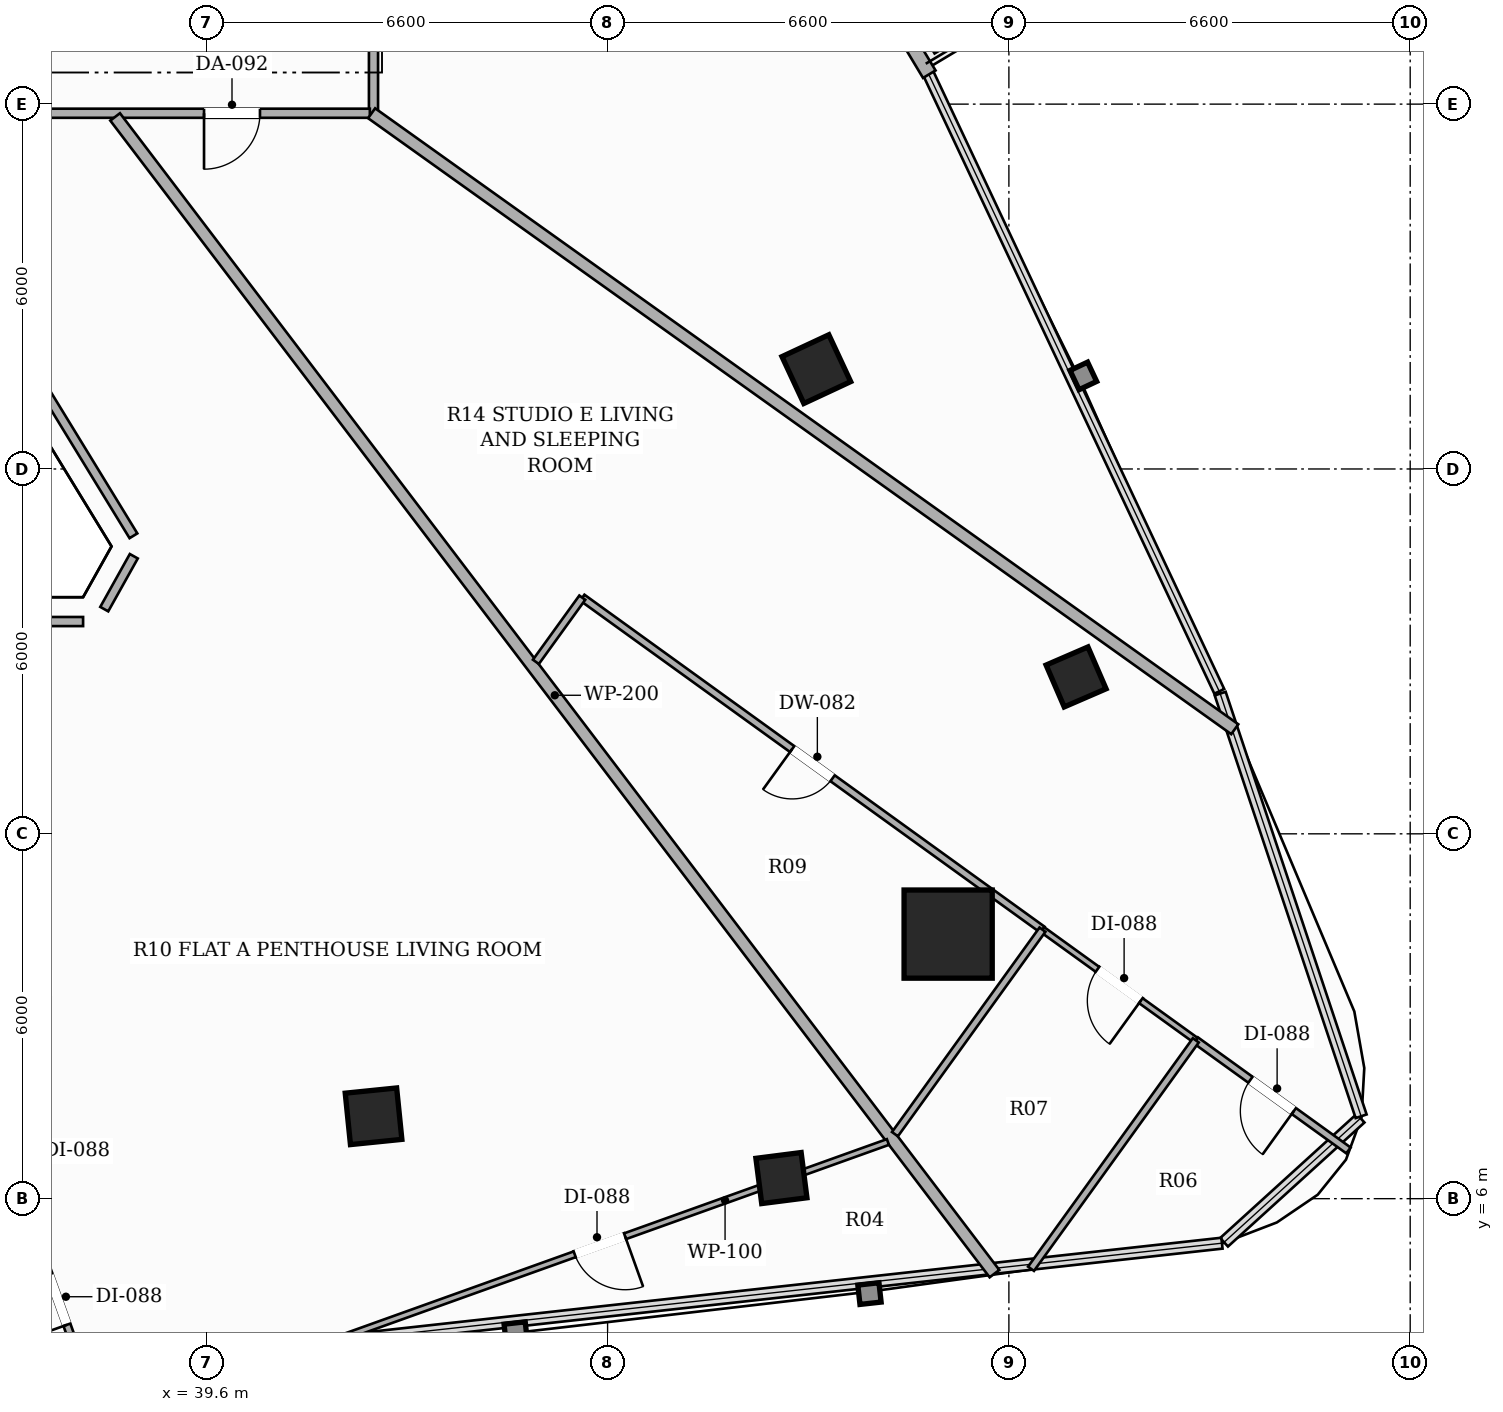
"""IFC4 building model, lengths in metres.
Left out: names, types, materials, properties, quantities, classifications, styles, units other than length and angle.
Written with IfcOpenShell. Run it as: python <this file> out.ifc"""

import sys

from ifc_helpers import new_model, si_unit, direction, frame, frame_2d, origin, origin_2d, place, context, subcontext, project, spatial, rectangle, hollow_rectangle, extrude, element, fill, save


model = new_model("IFC4")
c1 = context("Model", 3, precision=1e-05, world=origin(), true_north=direction((0.0, 1.0)))
c2 = subcontext(c1, "Body", "Model", "MODEL_VIEW")
j1 = project(units=[si_unit("LENGTHUNIT", "METRE"), si_unit("PLANEANGLEUNIT", "RADIAN")], contexts=[c1])
p1 = place(None, origin())
s1 = spatial("IfcSite", under=j1, at=p1, CompositionType="ELEMENT")
p2 = place(p1, origin())
s2 = spatial("IfcBuilding", under=s1, at=p2, CompositionType="ELEMENT")
p3 = place(p2, frame((0.0, 0.0, 136.4)))
s3 = spatial("IfcBuildingStorey", under=s2, at=p3, CompositionType="ELEMENT", Elevation=136.4)
p4 = place(p3, frame((51.801, 10.351, 0.0), z_axis=(0.0, 0.0, 1.0), x_axis=(1.0, 0.0, 0.0)))
e1 = element("IfcColumn", 1, at=p4, inside=s3, PredefinedType="COLUMN", context=c2, shape_type="SweptSolid", body=[
    extrude(hollow_rectangle(XDim=1.45, YDim=1.45, WallThickness=0.045, at=origin_2d()), origin(), (0.0, 0.0, 1.0), 3.3),
])
for number, where, z_axis, x_axis in (
    (2, (42.351, 7.355, 0.0), (0.0, 0.0, 1.0), (0.995, 0.101, 0.0)),
    (3, (49.633, 19.642, 0.0), (0.0, 0.0, 1.0), (-0.423, 0.906, 0.0)),
):
    element("IfcColumn", number, at=place(p3, frame(where, z_axis=z_axis, x_axis=x_axis)), inside=s3, PredefinedType="COLUMN", context=c2, shape_type="SweptSolid", body=[
        extrude(hollow_rectangle(XDim=0.85, YDim=0.85, WallThickness=0.028, at=origin_2d()), origin(), (0.0, 0.0, 1.0), 3.3),
    ])
for number, where, z_axis, x_axis in (
    (4, (49.059, 6.339, 0.0), (0.0, 0.0, 1.0), (0.992, 0.127, 0.0)),
    (5, (53.905, 14.58, 0.0), (0.0, 0.0, 1.0), (-0.397, 0.918, 0.0)),
):
    element("IfcColumn", number, at=place(p3, frame(where, z_axis=z_axis, x_axis=x_axis)), inside=s3, PredefinedType="COLUMN", context=c2, shape_type="SweptSolid", body=[
        extrude(hollow_rectangle(XDim=0.75, YDim=0.75, WallThickness=0.025, at=origin_2d()), origin(), (0.0, 0.0, 1.0), 3.3),
    ])
p5 = place(p3, frame((51.491, 24.492, 0.0), z_axis=(0.0, 0.0, 1.0), x_axis=(-0.514364263751, 0.857571807009, 0.0)))
e6 = element("IfcWall", 6, at=p5, inside=s3, PredefinedType="SOLIDWALL", context=c2, shape_type="SweptSolid", body=[
    extrude(rectangle(XDim=11.468, YDim=0.24, at=frame_2d((5.734, 0.0))), origin(), (0.0, 0.0, 1.0), 2.624),
])
p6 = place(p5, frame((8.972, 0.0, 0.0)))
e7 = element("IfcOpeningElement", 7, at=p6, cuts=e6, PredefinedType="OPENING", context=c2, shape_type="SweptSolid", body=[
    extrude(rectangle(XDim=1.8, YDim=2.2, at=frame_2d((0.9, 1.1))), frame((0.0, 0.13, 0.0), z_axis=(0.0, -1.0, 0.0), x_axis=(1.0, 0.0, 0.0)), (0.0, 0.0, 1.0), 0.26),
])
p7 = place(p3, frame((42.35, 28.34, 0.0), z_axis=(0.0, 0.0, 1.0), x_axis=(0.0, -1.0, 0.0)))
e8 = element("IfcWall", 8, at=p7, inside=s3, PredefinedType="PARTITIONING", context=c2, shape_type="SweptSolid", body=[
    extrude(rectangle(XDim=4.49, YDim=0.15, at=frame_2d((2.245, 0.0))), origin(), (0.0, 0.0, 1.0), 2.721),
])
p8 = place(p7, frame((1.805, 0.0, 0.0)))
e9 = element("IfcOpeningElement", 9, at=p8, cuts=e8, PredefinedType="OPENING", context=c2, shape_type="SweptSolid", body=[
    extrude(rectangle(XDim=0.88, YDim=2.1, at=frame_2d((0.44, 1.05))), frame((0.0, 0.085, 0.0), z_axis=(0.0, -1.0, 0.0), x_axis=(1.0, 0.0, 0.0)), (0.0, 0.0, 1.0), 0.17),
])
p9 = place(p3, frame((42.29, 23.85, 0.0), z_axis=(0.0, 0.0, 1.0), x_axis=(-1.0, 0.0, 0.0)))
e10 = element("IfcWall", 10, at=p9, inside=s3, PredefinedType="PARTITIONING", context=c2, shape_type="SweptSolid", body=[
    extrude(rectangle(XDim=8.134, YDim=0.15, at=frame_2d((4.067, 0.0))), origin(), (0.0, 0.0, 1.0), 2.492),
])
p10 = place(p9, frame((5.546, 0.0, 0.0)))
e11 = element("IfcOpeningElement", 11, at=p10, cuts=e10, PredefinedType="OPENING", context=c2, shape_type="SweptSolid", body=[
    extrude(rectangle(XDim=0.92, YDim=2.15, at=frame_2d((0.46, 1.075))), frame((0.0, 0.085, 0.0), z_axis=(0.0, -1.0, 0.0), x_axis=(1.0, 0.0, 0.0)), (0.0, 0.0, 1.0), 0.17),
])
p11 = place(p9, frame((1.807, 0.0, 0.0)))
e12 = element("IfcOpeningElement", 12, at=p11, cuts=e10, PredefinedType="OPENING", context=c2, shape_type="SweptSolid", body=[
    extrude(rectangle(XDim=0.92, YDim=2.15, at=frame_2d((0.46, 1.075))), frame((0.0, 0.085, 0.0), z_axis=(0.0, -1.0, 0.0), x_axis=(1.0, 0.0, 0.0)), (0.0, 0.0, 1.0), 0.17),
])
p12 = place(p3, frame((34.188, 23.79, 0.0), z_axis=(0.0, 0.0, 1.0), x_axis=(0.521816809014, -0.853057570057, 0.0)))
e13 = element("IfcWall", 13, at=p12, inside=s3, PredefinedType="PARTITIONING", context=c2, shape_type="SweptSolid", body=[
    extrude(rectangle(XDim=8.076, YDim=0.15, at=frame_2d((4.038, 0.0))), origin(), (0.0, 0.0, 1.0), 2.721),
])
p13 = place(p3, frame((38.408, 16.565, 0.0), z_axis=(0.0, 0.0, 1.0), x_axis=(-0.48761814532, -0.873057010942, 0.0)))
e14 = element("IfcWall", 14, at=p13, inside=s3, PredefinedType="PARTITIONING", context=c2, shape_type="SweptSolid", body=[
    extrude(rectangle(XDim=0.996, YDim=0.15, at=frame_2d((0.498, 0.0))), origin(), (0.0, 0.0, 1.0), 3.06),
])
p14 = place(p3, frame((37.574, 15.491, 0.0), z_axis=(0.0, 0.0, 1.0), x_axis=(-1.0, 0.0, 0.0)))
e15 = element("IfcWall", 15, at=p14, inside=s3, PredefinedType="PARTITIONING", context=c2, shape_type="SweptSolid", body=[
    extrude(rectangle(XDim=9.148, YDim=0.15, at=frame_2d((4.574, 0.0))), origin(), (0.0, 0.0, 1.0), 2.721),
])
p15 = place(p3, frame((38.101, 23.79, 0.0), z_axis=(0.0, 0.0, 1.0), x_axis=(0.605201904092, -0.796072016393, 0.0)))
e16 = element("IfcWall", 16, at=p15, inside=s3, PredefinedType="PARTITIONING", context=c2, shape_type="SweptSolid", body=[
    extrude(rectangle(XDim=23.896, YDim=0.2, at=frame_2d((11.948, 0.0))), origin(), (0.0, 0.0, 1.0), 2.413),
])
p16 = place(p3, frame((56.515, 13.72, 0.0), z_axis=(0.0, 0.0, 1.0), x_axis=(-0.813997291107, 0.580868668522, 0.0)))
e17 = element("IfcWall", 17, at=p16, inside=s3, PredefinedType="PARTITIONING", context=c2, shape_type="SweptSolid", body=[
    extrude(rectangle(XDim=17.44, YDim=0.2, at=frame_2d((8.72, 0.0))), origin(), (0.0, 0.0, 1.0), 2.413),
])
p17 = place(p3, frame((37.527, 3.315, 0.0), z_axis=(0.0, 0.0, 1.0), x_axis=(-0.337393850622, 0.9413635799, 0.0)))
e18 = element("IfcWall", 18, at=p17, inside=s3, PredefinedType="PARTITIONING", context=c2, shape_type="SweptSolid", body=[
    extrude(rectangle(XDim=2.179, YDim=0.12, at=frame_2d((1.089, 0.0))), origin(), (0.0, 0.0, 1.0), 3.06),
])
p18 = place(p17, frame((0.649, 0.0, 0.0)))
e19 = element("IfcOpeningElement", 19, at=p18, cuts=e18, PredefinedType="OPENING", context=c2, shape_type="SweptSolid", body=[
    extrude(rectangle(XDim=0.88, YDim=2.1, at=frame_2d((0.44, 1.05))), frame((0.0, 0.07, 0.0), z_axis=(0.0, -1.0, 0.0), x_axis=(1.0, 0.0, 0.0)), (0.0, 0.0, 1.0), 0.14),
])
p19 = place(p3, frame((50.81, 6.932, 0.0), z_axis=(0.0, 0.0, 1.0), x_axis=(-0.941340567411, -0.337458050943, 0.0)))
e20 = element("IfcWall", 20, at=p19, inside=s3, PredefinedType="PARTITIONING", context=c2, shape_type="SweptSolid", body=[
    extrude(rectangle(XDim=10.063, YDim=0.1, at=frame_2d((5.032, 0.0))), origin(), (0.0, 0.0, 1.0), 2.413),
])
p20 = place(p19, frame((4.592, 0.0, 0.0)))
e21 = element("IfcOpeningElement", 21, at=p20, cuts=e20, PredefinedType="OPENING", context=c2, shape_type="SweptSolid", body=[
    extrude(rectangle(XDim=0.88, YDim=2.1, at=frame_2d((0.44, 1.05))), frame((0.0, 0.06, 0.0), z_axis=(0.0, -1.0, 0.0), x_axis=(1.0, 0.0, 0.0)), (0.0, 0.0, 1.0), 0.12),
])
p21 = place(p3, frame((53.352, 10.424, 0.0), z_axis=(0.0, 0.0, 1.0), x_axis=(-0.810979209295, 0.585074971343, 0.0)))
e22 = element("IfcWall", 22, at=p21, inside=s3, PredefinedType="PARTITIONING", context=c2, shape_type="SweptSolid", body=[
    extrude(rectangle(XDim=9.332, YDim=0.12, at=frame_2d((4.666, 0.0))), origin(), (0.0, 0.0, 1.0), 2.413),
])
p22 = place(p21, frame((4.256, 0.0, 0.0)))
e23 = element("IfcOpeningElement", 23, at=p22, cuts=e22, PredefinedType="OPENING", context=c2, shape_type="SweptSolid", body=[
    extrude(rectangle(XDim=0.82, YDim=2.1, at=frame_2d((0.41, 1.05))), frame((0.0, 0.07, 0.0), z_axis=(0.0, -1.0, 0.0), x_axis=(1.0, 0.0, 0.0)), (0.0, 0.0, 1.0), 0.14),
])
p23 = place(p3, frame((45.784, 15.884, 0.0), z_axis=(0.0, 0.0, 1.0), x_axis=(-0.58557264979, -0.810619930558, 0.0)))
e24 = element("IfcWall", 24, at=p23, inside=s3, PredefinedType="PARTITIONING", context=c2, shape_type="SweptSolid", body=[
    extrude(rectangle(XDim=1.303, YDim=0.12, at=frame_2d((0.651, 0.0))), origin(), (0.0, 0.0, 1.0), 2.721),
])
p24 = place(p3, frame((58.385, 6.793, 0.0), z_axis=(0.0, 0.0, 1.0), x_axis=(-0.811055436316, 0.584969297675, 0.0)))
e25 = element("IfcWall", 25, at=p24, inside=s3, PredefinedType="PARTITIONING", context=c2, shape_type="SweptSolid", body=[
    extrude(rectangle(XDim=3.096, YDim=0.12, at=frame_2d((1.548, 0.0))), origin(), (0.0, 0.0, 1.0), 3.06),
])
p25 = place(p24, frame((1.108, 0.0, 0.0)))
e26 = element("IfcOpeningElement", 26, at=p25, cuts=e25, PredefinedType="OPENING", context=c2, shape_type="SweptSolid", body=[
    extrude(rectangle(XDim=0.88, YDim=2.1, at=frame_2d((0.44, 1.05))), frame((0.0, 0.07, 0.0), z_axis=(0.0, -1.0, 0.0), x_axis=(1.0, 0.0, 0.0)), (0.0, 0.0, 1.0), 0.14),
])
p26 = place(p3, frame((55.874, 8.604, 0.0), z_axis=(0.0, 0.0, 1.0), x_axis=(-0.810886170902, 0.585203911333, 0.0)))
e27 = element("IfcWall", 27, at=p26, inside=s3, PredefinedType="PARTITIONING", context=c2, shape_type="SweptSolid", body=[
    extrude(rectangle(XDim=3.11, YDim=0.1, at=frame_2d((1.555, 0.0))), origin(), (0.0, 0.0, 1.0), 2.619),
])
p27 = place(p26, frame((1.115, 0.0, 0.0)))
e28 = element("IfcOpeningElement", 28, at=p27, cuts=e27, PredefinedType="OPENING", context=c2, shape_type="SweptSolid", body=[
    extrude(rectangle(XDim=0.88, YDim=2.1, at=frame_2d((0.44, 1.05))), frame((0.0, 0.06, 0.0), z_axis=(0.0, -1.0, 0.0), x_axis=(1.0, 0.0, 0.0)), (0.0, 0.0, 1.0), 0.12),
])
p28 = place(p3, frame((53.352, 10.424, 0.0), z_axis=(0.0, 0.0, 1.0), x_axis=(-0.585041198475, -0.811003573412, 0.0)))
e29 = element("IfcWall", 29, at=p28, inside=s3, PredefinedType="PARTITIONING", context=c2, shape_type="SweptSolid", body=[
    extrude(rectangle(XDim=4.147, YDim=0.12, at=frame_2d((2.073, 0.0))), origin(), (0.0, 0.0, 1.0), 2.619),
])
p29 = place(p3, frame((53.164, 4.847, 0.0), z_axis=(0.0, 0.0, 1.0), x_axis=(0.58499591955, 0.81103623477, 0.0)))
e30 = element("IfcWall", 30, at=p29, inside=s3, PredefinedType="PARTITIONING", context=c2, shape_type="SweptSolid", body=[
    extrude(rectangle(XDim=4.632, YDim=0.12, at=frame_2d((2.316, 0.0))), origin(), (0.0, 0.0, 1.0), 3.06),
])
p30 = place(p18, origin())
e31 = element("IfcDoor", 31, at=p30, inside=s3, OperationType="SINGLE_SWING_LEFT", PredefinedType="DOOR", context=c2, shape_type="SweptSolid", body=[
    extrude(rectangle(XDim=0.88, YDim=2.1, at=frame_2d((0.44, 1.05))), frame((0.0, 0.025, 0.0), z_axis=(0.0, -1.0, 0.0), x_axis=(1.0, 0.0, 0.0)), (0.0, 0.0, 1.0), 0.05),
])
fill(e19, e31)
p31 = place(p20, origin())
e32 = element("IfcDoor", 32, at=p31, inside=s3, OperationType="SINGLE_SWING_LEFT", PredefinedType="DOOR", context=c2, shape_type="SweptSolid", body=[
    extrude(rectangle(XDim=0.88, YDim=2.1, at=frame_2d((0.44, 1.05))), frame((0.0, 0.025, 0.0), z_axis=(0.0, -1.0, 0.0), x_axis=(1.0, 0.0, 0.0)), (0.0, 0.0, 1.0), 0.05),
])
fill(e21, e32)
p32 = place(p11, origin())
e33 = element("IfcDoor", 33, at=p32, inside=s3, OperationType="SINGLE_SWING_RIGHT", PredefinedType="DOOR", context=c2, shape_type="SweptSolid", body=[
    extrude(rectangle(XDim=0.92, YDim=2.15, at=frame_2d((0.46, 1.075))), frame((0.0, 0.025, 0.0), z_axis=(0.0, -1.0, 0.0), x_axis=(1.0, 0.0, 0.0)), (0.0, 0.0, 1.0), 0.05),
])
fill(e12, e33)
p33 = place(p22, origin())
e34 = element("IfcDoor", 34, at=p33, inside=s3, OperationType="SINGLE_SWING_RIGHT", PredefinedType="DOOR", context=c2, shape_type="SweptSolid", body=[
    extrude(rectangle(XDim=0.82, YDim=2.1, at=frame_2d((0.41, 1.05))), frame((0.0, 0.025, 0.0), z_axis=(0.0, -1.0, 0.0), x_axis=(1.0, 0.0, 0.0)), (0.0, 0.0, 1.0), 0.05),
])
fill(e23, e34)
p34 = place(p25, origin())
e35 = element("IfcDoor", 35, at=p34, inside=s3, OperationType="SINGLE_SWING_LEFT", PredefinedType="DOOR", context=c2, shape_type="SweptSolid", body=[
    extrude(rectangle(XDim=0.88, YDim=2.1, at=frame_2d((0.44, 1.05))), frame((0.0, 0.025, 0.0), z_axis=(0.0, -1.0, 0.0), x_axis=(1.0, 0.0, 0.0)), (0.0, 0.0, 1.0), 0.05),
])
fill(e26, e35)
p35 = place(p27, origin())
e36 = element("IfcDoor", 36, at=p35, inside=s3, OperationType="SINGLE_SWING_LEFT", PredefinedType="DOOR", context=c2, shape_type="SweptSolid", body=[
    extrude(rectangle(XDim=0.88, YDim=2.1, at=frame_2d((0.44, 1.05))), frame((0.0, 0.025, 0.0), z_axis=(0.0, -1.0, 0.0), x_axis=(1.0, 0.0, 0.0)), (0.0, 0.0, 1.0), 0.05),
])
fill(e28, e36)
save(model, sys.argv[1])
